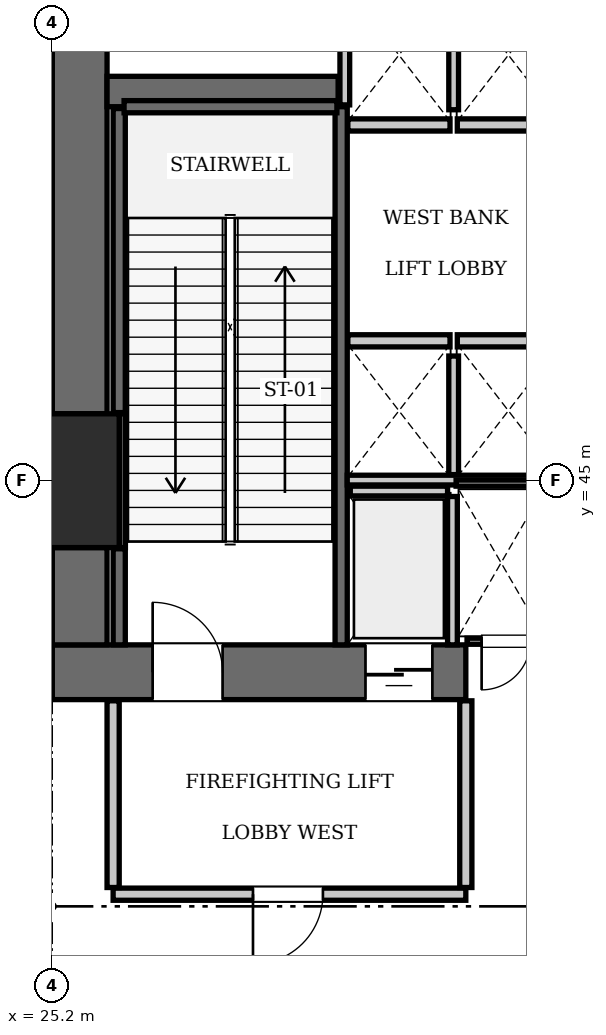
"""IFC4 building model, lengths in metres.
Left out: names, types, materials, properties, quantities, classifications, styles, units other than length and angle.
Written with IfcOpenShell. Run it as: python <this file> out.ifc"""

import sys

from ifc_helpers import new_model, si_unit, direction, frame, frame_2d, origin, origin_2d, place, context, subcontext, project, spatial, rectangle, extrude, element, fill, save


model = new_model("IFC4")
c1 = context("Model", 3, precision=1e-05, world=origin(), true_north=direction((0.0, 1.0)))
c2 = subcontext(c1, "Body", "Model", "MODEL_VIEW")
j1 = project(units=[si_unit("LENGTHUNIT", "METRE"), si_unit("PLANEANGLEUNIT", "RADIAN")], contexts=[c1])
p1 = place(None, origin())
s1 = spatial("IfcSite", under=j1, at=p1, CompositionType="ELEMENT")
p2 = place(p1, origin())
s2 = spatial("IfcBuilding", under=s1, at=p2, CompositionType="ELEMENT")
p3 = place(p2, frame((0.0, 0.0, 115.5)))
s3 = spatial("IfcBuildingStorey", under=s2, at=p3, CompositionType="ELEMENT", Elevation=115.5)
p4 = place(p3, frame((25.2, 45.0, 0.0), z_axis=(0.0, 0.0, 1.0), x_axis=(1.0, 0.0, 0.0)))
e1 = element("IfcColumn", 1, at=p4, inside=s3, PredefinedType="COLUMN", context=c2, shape_type="SweptSolid", body=[
    extrude(rectangle(XDim=2.2, YDim=2.2, at=origin_2d()), origin(), (0.0, 0.0, 1.0), 7.0),
])
p5 = place(p3, frame((25.2, 41.85, 0.0), z_axis=(0.0, 0.0, 1.0), x_axis=(1.0, 0.0, 0.0)))
e2 = element("IfcWall", 2, at=p5, inside=s3, PredefinedType="SHEAR", context=c2, shape_type="SweptSolid", body=[
    extrude(rectangle(XDim=6.8, YDim=0.9, at=frame_2d((3.4, 0.0))), origin(), (0.0, 0.0, 1.0), 7.0),
])
p6 = place(p5, frame((1.65, 0.0, 0.0)))
e3 = element("IfcOpeningElement", 3, at=p6, cuts=e2, PredefinedType="OPENING", context=c2, shape_type="SweptSolid", body=[
    extrude(rectangle(XDim=1.15, YDim=2.15, at=frame_2d((0.575, 1.075))), frame((0.0, 0.46, 0.0), z_axis=(0.0, -1.0, 0.0), x_axis=(1.0, 0.0, 0.0)), (0.0, 0.0, 1.0), 0.92),
])
p7 = place(p5, frame((5.15, 0.0, 0.0)))
e4 = element("IfcOpeningElement", 4, at=p7, cuts=e2, PredefinedType="OPENING", context=c2, shape_type="SweptSolid", body=[
    extrude(rectangle(XDim=1.1, YDim=2.2, at=frame_2d((0.55, 1.1))), frame((0.0, 0.46, 0.0), z_axis=(0.0, -1.0, 0.0), x_axis=(1.0, 0.0, 0.0)), (0.0, 0.0, 1.0), 0.92),
])
p8 = place(p3, frame((25.65, 42.3, 0.0), z_axis=(0.0, 0.0, 1.0), x_axis=(0.0, 1.0, 0.0)))
e5 = element("IfcWall", 5, at=p8, inside=s3, PredefinedType="SHEAR", context=c2, shape_type="SweptSolid", body=[
    extrude(rectangle(XDim=1.6, YDim=0.9, at=frame_2d((0.8, 0.0))), origin(), (0.0, 0.0, 1.0), 7.0),
])
p9 = place(p3, frame((25.65, 46.1, 0.0), z_axis=(0.0, 0.0, 1.0), x_axis=(0.0, 1.0, 0.0)))
e6 = element("IfcWall", 6, at=p9, inside=s3, PredefinedType="SHEAR", context=c2, shape_type="SweptSolid", body=[
    extrude(rectangle(XDim=7.0, YDim=0.9, at=frame_2d((3.5, 0.0))), origin(), (0.0, 0.0, 1.0), 7.0),
])
p10 = place(p3, frame((26.1, 51.4, 0.0), z_axis=(0.0, 0.0, 1.0), x_axis=(1.0, 0.0, 0.0)))
e7 = element("IfcWall", 7, at=p10, inside=s3, PredefinedType="SHEAR", context=c2, shape_type="SweptSolid", body=[
    extrude(rectangle(XDim=3.8, YDim=0.5, at=frame_2d((1.9, 0.0))), origin(), (0.0, 0.0, 1.0), 7.0),
])
p11 = place(p3, frame((29.95, 42.3, 0.0), z_axis=(0.0, 0.0, 1.0), x_axis=(0.0, 1.0, 0.0)))
e8 = element("IfcWall", 8, at=p11, inside=s3, PredefinedType="SOLIDWALL", context=c2, shape_type="SweptSolid", body=[
    extrude(rectangle(XDim=8.85, YDim=0.2, at=frame_2d((4.425, 0.0))), origin(), (0.0, 0.0, 1.0), 6.76),
])
p12 = place(p3, frame((26.3, 42.3, 0.0), z_axis=(0.0, 0.0, 1.0), x_axis=(0.0, 1.0, 0.0)))
e9 = element("IfcWall", 9, at=p12, inside=s3, PredefinedType="SOLIDWALL", context=c2, shape_type="SweptSolid", body=[
    extrude(rectangle(XDim=1.58, YDim=0.2, at=frame_2d((0.79, 0.0))), origin(), (0.0, 0.0, 1.0), 6.76),
])
p13 = place(p3, frame((26.3, 46.12, 0.0), z_axis=(0.0, 0.0, 1.0), x_axis=(0.0, 1.0, 0.0)))
e10 = element("IfcWall", 10, at=p13, inside=s3, PredefinedType="SOLIDWALL", context=c2, shape_type="SweptSolid", body=[
    extrude(rectangle(XDim=5.0, YDim=0.2, at=frame_2d((2.5, 0.0))), origin(), (0.0, 0.0, 1.0), 6.76),
])
p14 = place(p3, frame((26.38, 51.15, 0.0), z_axis=(0.0, 0.0, 1.0), x_axis=(1.0, 0.0, 0.0)))
e11 = element("IfcWall", 11, at=p14, inside=s3, PredefinedType="SOLIDWALL", context=c2, shape_type="SweptSolid", body=[
    extrude(rectangle(XDim=3.5, YDim=0.2, at=frame_2d((1.75, 0.0))), origin(), (0.0, 0.0, 1.0), 6.76),
])
p15 = place(p3, frame((26.352, 43.9, 0.0), z_axis=(0.0, 0.0, 1.0), x_axis=(0.0, 1.0, 0.0)))
e12 = element("IfcWall", 12, at=p15, inside=s3, PredefinedType="SOLIDWALL", context=c2, shape_type="SweptSolid", body=[
    extrude(rectangle(XDim=2.2, YDim=0.1, at=frame_2d((1.1, 0.0))), origin(), (0.0, 0.0, 1.0), 6.76),
])
for number, where, z_axis, x_axis in (
    (13, (30.06, 47.3, 0.0), (0.0, 0.0, 1.0), (1.0, 0.0, 0.0)),
    (14, (31.86, 47.3, 0.0), (0.0, 0.0, 1.0), (1.0, 0.0, 0.0)),
    (15, (30.06, 50.85, 0.0), (0.0, 0.0, 1.0), (1.0, 0.0, 0.0)),
):
    element("IfcWall", number, at=place(p3, frame(where, z_axis=z_axis, x_axis=x_axis)), inside=s3, PredefinedType="SOLIDWALL", context=c2, shape_type="SweptSolid", body=[
        extrude(rectangle(XDim=1.68, YDim=0.2, at=frame_2d((0.84, 0.0))), origin(), (0.0, 0.0, 1.0), 6.76),
    ])
p16 = place(p3, frame((31.86, 50.85, 0.0), z_axis=(0.0, 0.0, 1.0), x_axis=(1.0, 0.0, 0.0)))
e16 = element("IfcWall", 16, at=p16, inside=s3, PredefinedType="SOLIDWALL", context=c2, shape_type="SweptSolid", body=[
    extrude(rectangle(XDim=1.38, YDim=0.2, at=frame_2d((0.69, 0.0))), origin(), (0.0, 0.0, 1.0), 6.76),
])
p17 = place(p3, frame((30.1, 44.83, 0.0), z_axis=(0.0, 0.0, 1.0), x_axis=(1.0, 0.0, 0.0)))
e17 = element("IfcWall", 17, at=p17, inside=s3, PredefinedType="SOLIDWALL", context=c2, shape_type="SweptSolid", body=[
    extrude(rectangle(XDim=1.6, YDim=0.16, at=frame_2d((0.8, 0.0))), origin(), (0.0, 0.0, 1.0), 6.76),
])
p18 = place(p3, frame((31.78, 42.3, 0.0), z_axis=(0.0, 0.0, 1.0), x_axis=(0.0, 1.0, 0.0)))
e18 = element("IfcWall", 18, at=p18, inside=s3, PredefinedType="SOLIDWALL", context=c2, shape_type="SweptSolid", body=[
    extrude(rectangle(XDim=2.44, YDim=0.16, at=frame_2d((1.22, 0.0))), origin(), (0.0, 0.0, 1.0), 6.76),
])
p19 = place(p3, frame((31.8, 45.1, 0.0), z_axis=(0.0, 0.0, 1.0), x_axis=(0.0, 1.0, 0.0)))
e19 = element("IfcWall", 19, at=p19, inside=s3, PredefinedType="SOLIDWALL", context=c2, shape_type="SweptSolid", body=[
    extrude(rectangle(XDim=1.95, YDim=0.16, at=frame_2d((0.975, 0.0))), origin(), (0.0, 0.0, 1.0), 6.76),
])
p20 = place(p3, frame((30.05, 45.01, 0.0), z_axis=(0.0, 0.0, 1.0), x_axis=(1.0, 0.0, 0.0)))
e20 = element("IfcWall", 20, at=p20, inside=s3, PredefinedType="SOLIDWALL", context=c2, shape_type="SweptSolid", body=[
    extrude(rectangle(XDim=3.45, YDim=0.16, at=frame_2d((1.725, 0.0))), origin(), (0.0, 0.0, 1.0), 6.76),
])
p21 = place(p3, frame((30.01, 51.18, 0.0), z_axis=(0.0, 0.0, 1.0), x_axis=(0.0, 1.0, 0.0)))
e21 = element("IfcWall", 21, at=p21, inside=s3, PredefinedType="SOLIDWALL", context=c2, shape_type="SweptSolid", body=[
    extrude(rectangle(XDim=1.92, YDim=0.16, at=frame_2d((0.96, 0.0))), origin(), (0.0, 0.0, 1.0), 6.76),
])
p22 = place(p3, frame((31.8, 51.1, 0.0), z_axis=(0.0, 0.0, 1.0), x_axis=(0.0, 1.0, 0.0)))
e22 = element("IfcWall", 22, at=p22, inside=s3, PredefinedType="SOLIDWALL", context=c2, shape_type="SweptSolid", body=[
    extrude(rectangle(XDim=2.0, YDim=0.16, at=frame_2d((1.0, 0.0))), origin(), (0.0, 0.0, 1.0), 6.76),
])
p23 = place(p3, frame((26.2, 38.2, 0.0), z_axis=(0.0, 0.0, 1.0), x_axis=(1.0, 0.0, 0.0)))
e23 = element("IfcWall", 23, at=p23, inside=s3, PredefinedType="PARTITIONING", context=c2, shape_type="SweptSolid", body=[
    extrude(rectangle(XDim=5.8, YDim=0.2, at=frame_2d((2.9, 0.0))), origin(), (0.0, 0.0, 1.0), 6.76),
])
p24 = place(p23, frame((2.3, 0.0, 0.0)))
e24 = element("IfcOpeningElement", 24, at=p24, cuts=e23, PredefinedType="OPENING", context=c2, shape_type="SweptSolid", body=[
    extrude(rectangle(XDim=1.15, YDim=2.15, at=frame_2d((0.575, 1.075))), frame((0.0, 0.11, 0.0), z_axis=(0.0, -1.0, 0.0), x_axis=(1.0, 0.0, 0.0)), (0.0, 0.0, 1.0), 0.22),
])
for number, where, z_axis, x_axis in (
    (25, (26.2, 38.31, 0.0), (0.0, 0.0, 1.0), (0.0, 1.0, 0.0)),
    (26, (32.0, 38.31, 0.0), (0.0, 0.0, 1.0), (0.0, 1.0, 0.0)),
):
    element("IfcWall", number, at=place(p3, frame(where, z_axis=z_axis, x_axis=x_axis)), inside=s3, PredefinedType="PARTITIONING", context=c2, shape_type="SweptSolid", body=[
        extrude(rectangle(XDim=3.07, YDim=0.2, at=frame_2d((1.535, 0.0))), origin(), (0.0, 0.0, 1.0), 6.76),
    ])
p25 = place(p3, frame((32.02, 42.36, 0.0), z_axis=(0.0, 0.0, 1.0), x_axis=(1.0, 0.0, 0.0)))
e27 = element("IfcWall", 27, at=p25, inside=s3, PredefinedType="PARTITIONING", context=c2, shape_type="SweptSolid", body=[
    extrude(rectangle(XDim=1.32, YDim=0.1, at=frame_2d((0.66, 0.0))), origin(), (0.0, 0.0, 1.0), 6.76),
])
p26 = place(p25, frame((0.24, 0.0, 0.0)))
e28 = element("IfcOpeningElement", 28, at=p26, cuts=e27, PredefinedType="OPENING", context=c2, shape_type="SweptSolid", body=[
    extrude(rectangle(XDim=0.8, YDim=2.05, at=frame_2d((0.4, 1.025))), frame((0.0, 0.06, 0.0), z_axis=(0.0, -1.0, 0.0), x_axis=(1.0, 0.0, 0.0)), (0.0, 0.0, 1.0), 0.12),
])
p27 = place(p3, frame((31.84, 44.96, 0.0), z_axis=(0.0, 0.0, 1.0), x_axis=(1.0, 0.0, 0.0)))
e29 = element("IfcWall", 29, at=p27, inside=s3, PredefinedType="PARTITIONING", context=c2, shape_type="SweptSolid", body=[
    extrude(rectangle(XDim=1.48, YDim=0.1, at=frame_2d((0.74, 0.0))), origin(), (0.0, 0.0, 1.0), 6.76),
])
p28 = place(p6, origin())
e30 = element("IfcDoor", 30, at=p28, inside=s3, OperationType="SINGLE_SWING_LEFT", PredefinedType="DOOR", context=c2, shape_type="SweptSolid", body=[
    extrude(rectangle(XDim=1.15, YDim=2.15, at=frame_2d((0.575, 1.075))), frame((0.0, 0.025, 0.0), z_axis=(0.0, -1.0, 0.0), x_axis=(1.0, 0.0, 0.0)), (0.0, 0.0, 1.0), 0.05),
])
fill(e3, e30)
p29 = place(p7, frame((1.1, 0.0, 0.0), z_axis=(0.0, 0.0, 1.0), x_axis=(-1.0, 0.0, 0.0)))
e31 = element("IfcDoor", 31, at=p29, inside=s3, OperationType="SLIDING_TO_LEFT", PredefinedType="DOOR", context=c2, shape_type="SweptSolid", body=[
    extrude(rectangle(XDim=1.1, YDim=2.2, at=frame_2d((0.55, 1.1))), frame((0.0, 0.025, 0.0), z_axis=(0.0, -1.0, 0.0), x_axis=(1.0, 0.0, 0.0)), (0.0, 0.0, 1.0), 0.05),
])
fill(e4, e31)
p30 = place(p24, frame((1.15, 0.0, 0.0), z_axis=(0.0, 0.0, 1.0), x_axis=(-1.0, 0.0, 0.0)))
e32 = element("IfcDoor", 32, at=p30, inside=s3, OperationType="SINGLE_SWING_RIGHT", PredefinedType="DOOR", context=c2, shape_type="SweptSolid", body=[
    extrude(rectangle(XDim=1.15, YDim=2.15, at=frame_2d((0.575, 1.075))), frame((0.0, 0.025, 0.0), z_axis=(0.0, -1.0, 0.0), x_axis=(1.0, 0.0, 0.0)), (0.0, 0.0, 1.0), 0.05),
])
fill(e24, e32)
p31 = place(p26, frame((0.8, 0.0, 0.0), z_axis=(0.0, 0.0, 1.0), x_axis=(-1.0, 0.0, 0.0)))
e33 = element("IfcDoor", 33, at=p31, inside=s3, OperationType="SINGLE_SWING_RIGHT", PredefinedType="DOOR", context=c2, shape_type="SweptSolid", body=[
    extrude(rectangle(XDim=0.8, YDim=2.05, at=frame_2d((0.4, 1.025))), frame((0.0, 0.025, 0.0), z_axis=(0.0, -1.0, 0.0), x_axis=(1.0, 0.0, 0.0)), (0.0, 0.0, 1.0), 0.05),
])
fill(e28, e33)
save(model, sys.argv[1])
